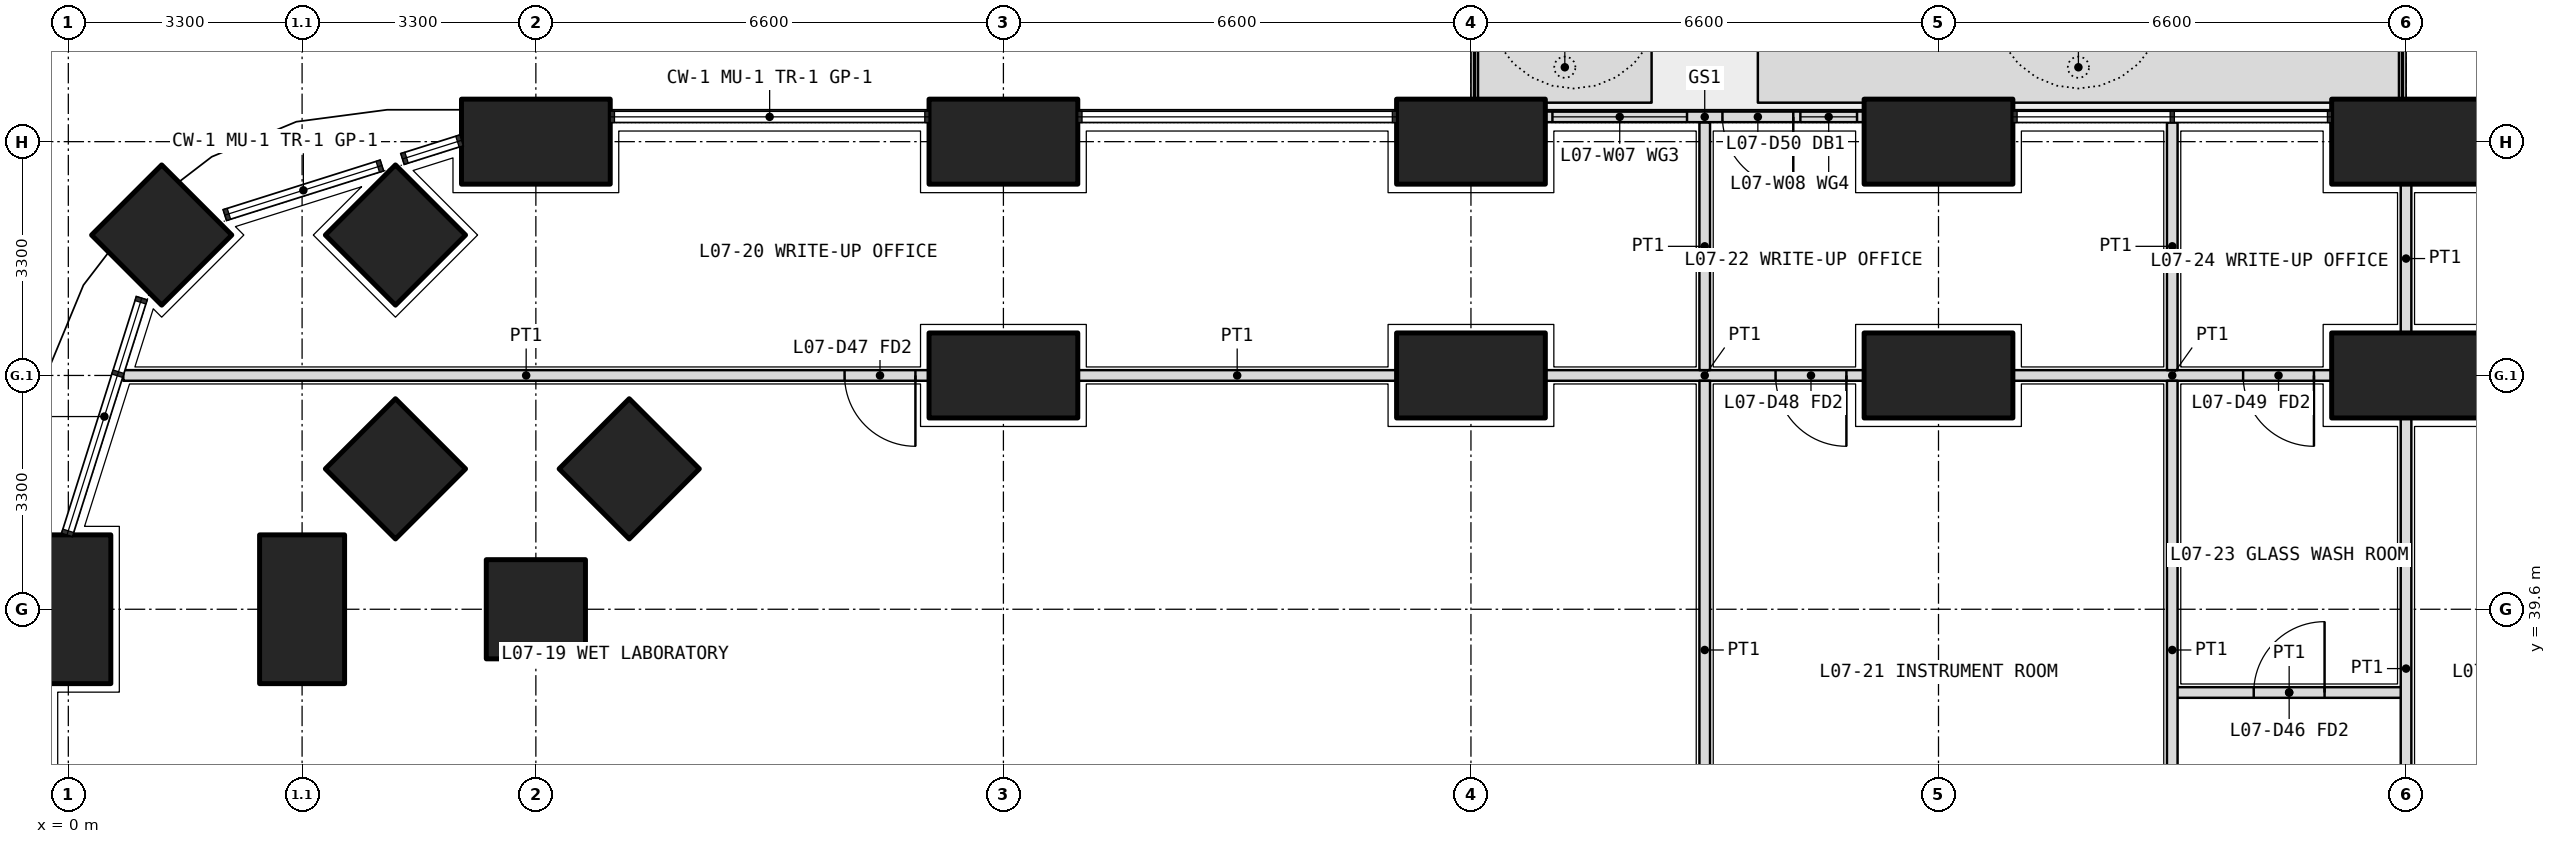
"""IFC4 building model, lengths in metres.
Left out: names, types, materials, properties, quantities, classifications, styles, units other than length and angle.
Written with IfcOpenShell. Run it as: python <this file> out.ifc"""

import sys

from ifc_helpers import new_model, si_unit, direction, frame, frame_2d, origin, origin_2d, place, context, subcontext, project, spatial, polyline, rectangle, outline, extrude, element, fill, save


model = new_model("IFC4")
c1 = context("Model", 3, precision=1e-05, world=origin(), true_north=direction((0.0, 1.0)))
c2 = subcontext(c1, "Body", "Model", "MODEL_VIEW")
j1 = project(units=[si_unit("LENGTHUNIT", "METRE"), si_unit("PLANEANGLEUNIT", "RADIAN")], contexts=[c1])
p1 = place(None, origin())
s1 = spatial("IfcSite", under=j1, at=p1, CompositionType="ELEMENT")
p2 = place(p1, origin())
s2 = spatial("IfcBuilding", under=s1, at=p2, CompositionType="ELEMENT")
p3 = place(p2, frame((0.0, 0.0, 33.9)))
s3 = spatial("IfcBuildingStorey", under=s2, at=p3, CompositionType="ELEMENT", Elevation=33.9)
p4 = place(p3, frame((1.318, 44.882, 0.0), z_axis=(0.0, 0.0, 1.0), x_axis=(0.707106781187, 0.707106781187, 0.0)))
e1 = element("IfcColumn", 1, at=p4, inside=s3, PredefinedType="COLUMN", context=c2, shape_type="SweptSolid", body=[
    extrude(rectangle(XDim=1.4, YDim=1.4, at=origin_2d()), origin(), (0.0, 0.0, 1.0), 4.2),
])
for number, where, z_axis, x_axis in (
    (2, (0.0, 39.6, 0.0), (0.0, 0.0, 1.0), (0.0, 1.0, 0.0)),
    (3, (6.6, 46.2, 0.0), (0.0, 0.0, 1.0), (1.0, 0.0, 0.0)),
    (4, (13.2, 46.2, 0.0), (0.0, 0.0, 1.0), (1.0, 0.0, 0.0)),
    (5, (19.8, 46.2, 0.0), (0.0, 0.0, 1.0), (1.0, 0.0, 0.0)),
    (6, (26.4, 46.2, 0.0), (0.0, 0.0, 1.0), (1.0, 0.0, 0.0)),
    (7, (33.0, 46.2, 0.0), (0.0, 0.0, 1.0), (1.0, 0.0, 0.0)),
):
    element("IfcColumn", number, at=place(p3, frame(where, z_axis=z_axis, x_axis=x_axis)), inside=s3, PredefinedType="COLUMN", context=c2, shape_type="SweptSolid", body=[
        extrude(rectangle(XDim=2.1, YDim=1.2, at=origin_2d()), origin(), (0.0, 0.0, 1.0), 4.2),
    ])
for number, where, z_axis, x_axis in (
    (8, (6.6, 39.6, 0.0), (0.0, 0.0, 1.0), (1.0, 0.0, 0.0)),
    (9, (4.618, 44.882, 0.0), (0.0, 0.0, 1.0), (0.707, 0.707, 0.0)),
):
    element("IfcColumn", number, at=place(p3, frame(where, z_axis=z_axis, x_axis=x_axis)), inside=s3, PredefinedType="COLUMN", context=c2, shape_type="SweptSolid", body=[
        extrude(rectangle(XDim=1.4, YDim=1.4, at=origin_2d()), origin(), (0.0, 0.0, 1.0), 4.2),
    ])
p5 = place(p3, frame((3.3, 39.6, 0.0), z_axis=(0.0, 0.0, 1.0), x_axis=(0.0, 1.0, 0.0)))
e10 = element("IfcColumn", 10, at=p5, inside=s3, PredefinedType="COLUMN", context=c2, shape_type="SweptSolid", body=[
    extrude(rectangle(XDim=2.1, YDim=1.2, at=origin_2d()), origin(), (0.0, 0.0, 1.0), 4.2),
])
p6 = place(p3, frame((4.618, 41.582, 0.0), z_axis=(0.0, 0.0, 1.0), x_axis=(0.707106781187, 0.707106781187, 0.0)))
e11 = element("IfcColumn", 11, at=p6, inside=s3, PredefinedType="COLUMN", context=c2, shape_type="SweptSolid", body=[
    extrude(rectangle(XDim=1.4, YDim=1.4, at=origin_2d()), origin(), (0.0, 0.0, 1.0), 4.2),
])
for number, where, z_axis, x_axis in (
    (12, (13.2, 42.9, 0.0), (0.0, 0.0, 1.0), (1.0, 0.0, 0.0)),
    (13, (19.8, 42.9, 0.0), (0.0, 0.0, 1.0), (1.0, 0.0, 0.0)),
    (14, (26.4, 42.9, 0.0), (0.0, 0.0, 1.0), (1.0, 0.0, 0.0)),
    (15, (33.0, 42.9, 0.0), (0.0, 0.0, 1.0), (1.0, 0.0, 0.0)),
):
    element("IfcColumn", number, at=place(p3, frame(where, z_axis=z_axis, x_axis=x_axis)), inside=s3, PredefinedType="COLUMN", context=c2, shape_type="SweptSolid", body=[
        extrude(rectangle(XDim=2.1, YDim=1.2, at=origin_2d()), origin(), (0.0, 0.0, 1.0), 4.2),
    ])
p7 = place(p3, frame((7.918, 41.582, 0.0), z_axis=(0.0, 0.0, 1.0), x_axis=(0.707106781187, 0.707106781187, 0.0)))
e16 = element("IfcColumn", 16, at=p7, inside=s3, PredefinedType="COLUMN", context=c2, shape_type="SweptSolid", body=[
    extrude(rectangle(XDim=1.4, YDim=1.4, at=origin_2d()), origin(), (0.0, 0.0, 1.0), 4.2),
])
p8 = place(p3, origin())
e17 = element("IfcWall", 17, at=p8, inside=s3, PredefinedType="USERDEFINED", context=c2, shape_type="SweptSolid", body=[
    extrude(outline(polyline([(19.9, 46.75), (22.35, 46.75), (22.35, 47.75), (19.9, 47.75), (19.9, 46.75)]), holes=[polyline([(20.05, 46.9), (22.2, 46.9), (22.2, 47.6), (20.05, 47.6), (20.05, 46.9)])]), origin(), (0.0, 0.0, 1.0), 1.05),
])
p9 = place(p3, origin())
e18 = element("IfcWall", 18, at=p9, inside=s3, PredefinedType="USERDEFINED", context=c2, shape_type="SweptSolid", body=[
    extrude(outline(polyline([(23.85, 46.75), (32.9, 46.75), (32.9, 47.75), (23.85, 47.75), (23.85, 46.75)]), holes=[polyline([(24.0, 46.9), (32.75, 46.9), (32.75, 47.6), (24.0, 47.6), (24.0, 46.9)])]), origin(), (0.0, 0.0, 1.0), 1.05),
])
p10 = place(p3, frame((25.35, 46.55, 0.0), z_axis=(0.0, 0.0, 1.0), x_axis=(-1.0, 0.0, 0.0)))
e19 = element("IfcWall", 19, at=p10, inside=s3, PredefinedType="SOLIDWALL", context=c2, shape_type="SweptSolid", body=[
    extrude(rectangle(XDim=4.5, YDim=0.15, at=frame_2d((2.25, 0.0))), origin(), (0.0, 0.0, 1.0), 2.7),
])
p11 = place(p10, frame((1.0, 0.0, 0.0)))
e20 = element("IfcOpeningElement", 20, at=p11, cuts=e19, PredefinedType="OPENING", context=c2, shape_type="SweptSolid", body=[
    extrude(rectangle(XDim=1.0, YDim=2.4, at=frame_2d((0.5, 1.2))), frame((0.0, 0.085, 0.0), z_axis=(0.0, -1.0, 0.0), x_axis=(1.0, 0.0, 0.0)), (0.0, 0.0, 1.0), 0.17),
])
p12 = place(p10, frame((0.1, 0.0, 0.1)))
e21 = element("IfcOpeningElement", 21, at=p12, cuts=e19, PredefinedType="OPENING", context=c2, shape_type="SweptSolid", body=[
    extrude(rectangle(XDim=0.8, YDim=2.3, at=frame_2d((0.4, 1.15))), frame((0.0, 0.085, 0.0), z_axis=(0.0, -1.0, 0.0), x_axis=(1.0, 0.0, 0.0)), (0.0, 0.0, 1.0), 0.17),
])
p13 = place(p10, frame((2.5, 0.0, 0.1)))
e22 = element("IfcOpeningElement", 22, at=p13, cuts=e19, PredefinedType="OPENING", context=c2, shape_type="SweptSolid", body=[
    extrude(rectangle(XDim=1.9, YDim=2.3, at=frame_2d((0.95, 1.15))), frame((0.0, 0.085, 0.0), z_axis=(0.0, -1.0, 0.0), x_axis=(1.0, 0.0, 0.0)), (0.0, 0.0, 1.0), 0.17),
])
p14 = place(p3, frame((31.95, 42.9, 0.0), z_axis=(0.0, 0.0, 1.0), x_axis=(-1.0, 0.0, 0.0)))
e23 = element("IfcWall", 23, at=p14, inside=s3, PredefinedType="PARTITIONING", context=c2, shape_type="SweptSolid", body=[
    extrude(rectangle(XDim=4.5, YDim=0.15, at=frame_2d((2.25, 0.0))), origin(), (0.0, 0.0, 1.0), 3.9),
])
p15 = place(p14, frame((0.25, 0.0, 0.0)))
e24 = element("IfcOpeningElement", 24, at=p15, cuts=e23, PredefinedType="OPENING", context=c2, shape_type="SweptSolid", body=[
    extrude(rectangle(XDim=1.0, YDim=2.1, at=frame_2d((0.5, 1.05))), frame((0.0, 0.085, 0.0), z_axis=(0.0, -1.0, 0.0), x_axis=(1.0, 0.0, 0.0)), (0.0, 0.0, 1.0), 0.17),
])
p16 = place(p3, frame((25.35, 42.9, 0.0), z_axis=(0.0, 0.0, 1.0), x_axis=(-1.0, 0.0, 0.0)))
e25 = element("IfcWall", 25, at=p16, inside=s3, PredefinedType="PARTITIONING", context=c2, shape_type="SweptSolid", body=[
    extrude(rectangle(XDim=4.5, YDim=0.15, at=frame_2d((2.25, 0.0))), origin(), (0.0, 0.0, 1.0), 3.9),
])
p17 = place(p16, frame((0.25, 0.0, 0.0)))
e26 = element("IfcOpeningElement", 26, at=p17, cuts=e25, PredefinedType="OPENING", context=c2, shape_type="SweptSolid", body=[
    extrude(rectangle(XDim=1.0, YDim=2.1, at=frame_2d((0.5, 1.05))), frame((0.0, 0.085, 0.0), z_axis=(0.0, -1.0, 0.0), x_axis=(1.0, 0.0, 0.0)), (0.0, 0.0, 1.0), 0.17),
])
p18 = place(p3, frame((18.75, 42.9, 0.0), z_axis=(0.0, 0.0, 1.0), x_axis=(-1.0, 0.0, 0.0)))
e27 = element("IfcWall", 27, at=p18, inside=s3, PredefinedType="PARTITIONING", context=c2, shape_type="SweptSolid", body=[
    extrude(rectangle(XDim=4.5, YDim=0.15, at=frame_2d((2.25, 0.0))), origin(), (0.0, 0.0, 1.0), 3.9),
])
p19 = place(p3, frame((12.15, 42.9, 0.0), z_axis=(0.0, 0.0, 1.0), x_axis=(-1.0, 0.0, 0.0)))
e28 = element("IfcWall", 28, at=p19, inside=s3, PredefinedType="PARTITIONING", context=c2, shape_type="SweptSolid", body=[
    extrude(rectangle(XDim=11.374, YDim=0.15, at=frame_2d((5.687, 0.0))), origin(), (0.0, 0.0, 1.0), 2.7),
])
p20 = place(p19, frame((0.192, 0.0, 0.0)))
e29 = element("IfcOpeningElement", 29, at=p20, cuts=e28, PredefinedType="OPENING", context=c2, shape_type="SweptSolid", body=[
    extrude(rectangle(XDim=1.0, YDim=2.1, at=frame_2d((0.5, 1.05))), frame((0.0, 0.085, 0.0), z_axis=(0.0, -1.0, 0.0), x_axis=(1.0, 0.0, 0.0)), (0.0, 0.0, 1.0), 0.17),
])
p21 = place(p3, frame((29.7, 38.425, 0.0), z_axis=(0.0, 0.0, 1.0), x_axis=(1.0, 0.0, 0.0)))
e30 = element("IfcWall", 30, at=p21, inside=s3, PredefinedType="PARTITIONING", context=c2, shape_type="SweptSolid", body=[
    extrude(rectangle(XDim=3.3, YDim=0.15, at=frame_2d((1.65, 0.0))), origin(), (0.0, 0.0, 1.0), 2.85),
])
p22 = place(p21, frame((1.15, 0.0, 0.0)))
e31 = element("IfcOpeningElement", 31, at=p22, cuts=e30, PredefinedType="OPENING", context=c2, shape_type="SweptSolid", body=[
    extrude(rectangle(XDim=1.0, YDim=2.1, at=frame_2d((0.5, 1.05))), frame((0.0, 0.085, 0.0), z_axis=(0.0, -1.0, 0.0), x_axis=(1.0, 0.0, 0.0)), (0.0, 0.0, 1.0), 0.17),
])
p23 = place(p3, frame((23.1, 46.47, 0.0), z_axis=(0.0, 0.0, 1.0), x_axis=(0.0, -1.0, 0.0)))
e32 = element("IfcWall", 32, at=p23, inside=s3, PredefinedType="PARTITIONING", context=c2, shape_type="SweptSolid", body=[
    extrude(rectangle(XDim=3.495, YDim=0.15, at=frame_2d((1.748, 0.0))), origin(), (0.0, 0.0, 1.0), 2.7),
])
p24 = place(p3, frame((23.1, 42.825, 0.0), z_axis=(0.0, 0.0, 1.0), x_axis=(0.0, -1.0, 0.0)))
e33 = element("IfcWall", 33, at=p24, inside=s3, PredefinedType="PARTITIONING", context=c2, shape_type="SweptSolid", body=[
    extrude(rectangle(XDim=7.6, YDim=0.15, at=frame_2d((3.8, 0.0))), origin(), (0.0, 0.0, 1.0), 3.9),
])
p25 = place(p3, frame((29.7, 46.47, 0.0), z_axis=(0.0, 0.0, 1.0), x_axis=(0.0, -1.0, 0.0)))
e34 = element("IfcWall", 34, at=p25, inside=s3, PredefinedType="PARTITIONING", context=c2, shape_type="SweptSolid", body=[
    extrude(rectangle(XDim=3.495, YDim=0.15, at=frame_2d((1.748, 0.0))), origin(), (0.0, 0.0, 1.0), 2.7),
])
p26 = place(p3, frame((29.7, 42.825, 0.0), z_axis=(0.0, 0.0, 1.0), x_axis=(0.0, -1.0, 0.0)))
e35 = element("IfcWall", 35, at=p26, inside=s3, PredefinedType="PARTITIONING", context=c2, shape_type="SweptSolid", body=[
    extrude(rectangle(XDim=7.6, YDim=0.15, at=frame_2d((3.8, 0.0))), origin(), (0.0, 0.0, 1.0), 3.9),
])
p27 = place(p3, frame((33.0, 45.6, 0.0), z_axis=(0.0, 0.0, 1.0), x_axis=(0.0, -1.0, 0.0)))
e36 = element("IfcWall", 36, at=p27, inside=s3, PredefinedType="PARTITIONING", context=c2, shape_type="SweptSolid", body=[
    extrude(rectangle(XDim=2.1, YDim=0.15, at=frame_2d((1.05, 0.0))), origin(), (0.0, 0.0, 1.0), 2.85),
])
p28 = place(p3, frame((33.0, 42.3, 0.0), z_axis=(0.0, 0.0, 1.0), x_axis=(0.0, -1.0, 0.0)))
e37 = element("IfcWall", 37, at=p28, inside=s3, PredefinedType="PARTITIONING", context=c2, shape_type="SweptSolid", body=[
    extrude(rectangle(XDim=7.075, YDim=0.15, at=frame_2d((3.538, 0.0))), origin(), (0.0, 0.0, 1.0), 2.85),
])
p29 = place(p11, origin())
e38 = element("IfcDoor", 38, at=p29, inside=s3, OperationType="SINGLE_SWING_LEFT", PredefinedType="DOOR", context=c2, shape_type="SweptSolid", body=[
    extrude(rectangle(XDim=1.0, YDim=2.4, at=frame_2d((0.5, 1.2))), frame((0.0, 0.025, 0.0), z_axis=(0.0, -1.0, 0.0), x_axis=(1.0, 0.0, 0.0)), (0.0, 0.0, 1.0), 0.05),
])
fill(e20, e38)
p30 = place(p12, origin())
e39 = element("IfcWindow", 39, at=p30, inside=s3, PartitioningType="SINGLE_PANEL", PredefinedType="WINDOW", context=c2, shape_type="SweptSolid", body=[
    extrude(rectangle(XDim=0.8, YDim=2.3, at=frame_2d((0.4, 1.15))), frame((0.0, 0.03, 0.0), z_axis=(0.0, -1.0, 0.0), x_axis=(1.0, 0.0, 0.0)), (0.0, 0.0, 1.0), 0.06),
])
fill(e21, e39)
p31 = place(p13, origin())
e40 = element("IfcWindow", 40, at=p31, inside=s3, PartitioningType="SINGLE_PANEL", PredefinedType="WINDOW", context=c2, shape_type="SweptSolid", body=[
    extrude(rectangle(XDim=1.9, YDim=2.3, at=frame_2d((0.95, 1.15))), frame((0.0, 0.03, 0.0), z_axis=(0.0, -1.0, 0.0), x_axis=(1.0, 0.0, 0.0)), (0.0, 0.0, 1.0), 0.06),
])
fill(e22, e40)
p32 = place(p20, origin())
e41 = element("IfcDoor", 41, at=p32, inside=s3, OperationType="SINGLE_SWING_LEFT", PredefinedType="DOOR", context=c2, shape_type="SweptSolid", body=[
    extrude(rectangle(XDim=1.0, YDim=2.1, at=frame_2d((0.5, 1.05))), frame((0.0, 0.025, 0.0), z_axis=(0.0, -1.0, 0.0), x_axis=(1.0, 0.0, 0.0)), (0.0, 0.0, 1.0), 0.05),
])
fill(e29, e41)
p33 = place(p17, origin())
e42 = element("IfcDoor", 42, at=p33, inside=s3, OperationType="SINGLE_SWING_LEFT", PredefinedType="DOOR", context=c2, shape_type="SweptSolid", body=[
    extrude(rectangle(XDim=1.0, YDim=2.1, at=frame_2d((0.5, 1.05))), frame((0.0, 0.025, 0.0), z_axis=(0.0, -1.0, 0.0), x_axis=(1.0, 0.0, 0.0)), (0.0, 0.0, 1.0), 0.05),
])
fill(e26, e42)
p34 = place(p22, origin())
e43 = element("IfcDoor", 43, at=p34, inside=s3, OperationType="SINGLE_SWING_RIGHT", PredefinedType="DOOR", context=c2, shape_type="SweptSolid", body=[
    extrude(rectangle(XDim=1.0, YDim=2.1, at=frame_2d((0.5, 1.05))), frame((0.0, 0.025, 0.0), z_axis=(0.0, -1.0, 0.0), x_axis=(1.0, 0.0, 0.0)), (0.0, 0.0, 1.0), 0.05),
])
fill(e31, e43)
p35 = place(p15, origin())
e44 = element("IfcDoor", 44, at=p35, inside=s3, OperationType="SINGLE_SWING_LEFT", PredefinedType="DOOR", context=c2, shape_type="SweptSolid", body=[
    extrude(rectangle(XDim=1.0, YDim=2.1, at=frame_2d((0.5, 1.05))), frame((0.0, 0.025, 0.0), z_axis=(0.0, -1.0, 0.0), x_axis=(1.0, 0.0, 0.0)), (0.0, 0.0, 1.0), 0.05),
])
fill(e24, e44)
save(model, sys.argv[1])
